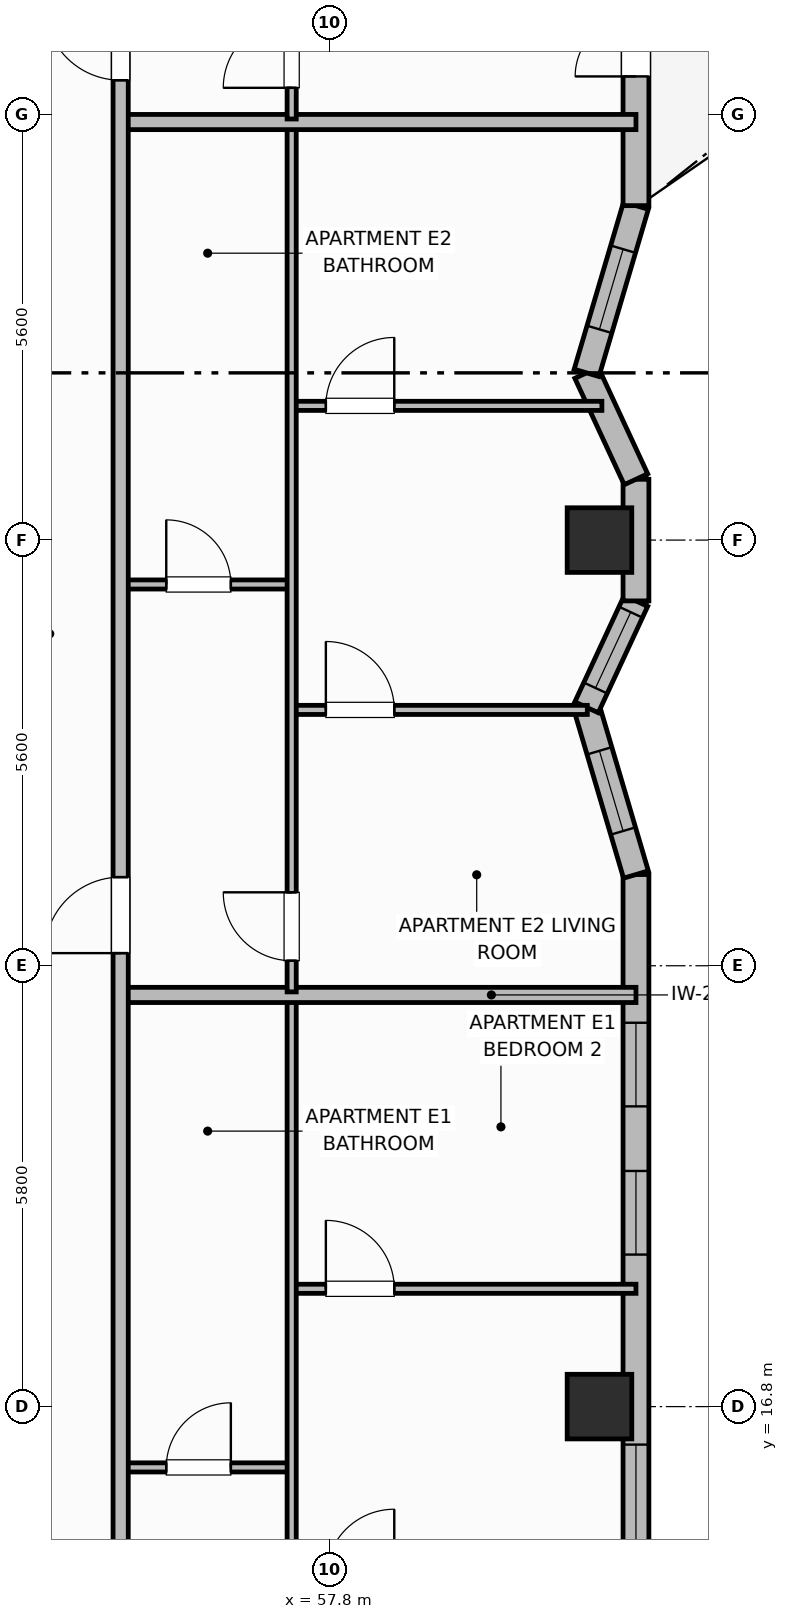
"""IFC4 building model, lengths in metres.
Left out: names, types, materials, properties, quantities, classifications, styles, units other than length and angle.
Written with IfcOpenShell. Run it as: python <this file> out.ifc"""

import sys

from ifc_helpers import new_model, si_unit, direction, frame, frame_2d, origin, origin_2d, place, context, subcontext, project, spatial, rectangle, extrude, element, fill, save


model = new_model("IFC4")
c1 = context("Model", 3, precision=1e-05, world=origin(), true_north=direction((0.0, 1.0)))
c2 = subcontext(c1, "Body", "Model", "MODEL_VIEW")
j1 = project(units=[si_unit("LENGTHUNIT", "METRE"), si_unit("PLANEANGLEUNIT", "RADIAN")], contexts=[c1])
p1 = place(None, origin())
s1 = spatial("IfcSite", under=j1, at=p1, CompositionType="ELEMENT")
p2 = place(p1, origin())
s2 = spatial("IfcBuilding", under=s1, at=p2, CompositionType="ELEMENT")
p3 = place(p2, frame((0.0, 0.0, 211.0)))
s3 = spatial("IfcBuildingStorey", under=s2, at=p3, CompositionType="ELEMENT", Elevation=211.0)
for number, where, z_axis, x_axis in (
    (1, (61.35, 16.8, 0.0), (0.0, 0.0, 1.0), (1.0, 0.0, 0.0)),
    (2, (61.35, 28.2, 0.0), (0.0, 0.0, 1.0), (1.0, 0.0, 0.0)),
):
    element("IfcColumn", number, at=place(p3, frame(where, z_axis=z_axis, x_axis=x_axis)), inside=s3, PredefinedType="COLUMN", context=c2, shape_type="SweptSolid", body=[
        extrude(rectangle(XDim=0.85, YDim=0.85, at=origin_2d()), origin(), (0.0, 0.0, 1.0), 3.7),
    ])
p4 = place(p3, frame((61.83, 10.5, 0.0), z_axis=(0.0, 0.0, 1.0), x_axis=(0.0, 1.0, 0.0)))
e3 = element("IfcWall", 3, at=p4, inside=s3, PredefinedType="SOLIDWALL", context=c2, shape_type="SweptSolid", body=[
    extrude(rectangle(XDim=13.3, YDim=0.34, at=frame_2d((6.65, 0.0))), origin(), (0.0, 0.0, 1.0), 2.72),
])
p5 = place(p4, frame((1.6, 0.0, 0.95)))
e4 = element("IfcOpeningElement", 4, at=p5, cuts=e3, PredefinedType="OPENING", context=c2, shape_type="SweptSolid", body=[
    extrude(rectangle(XDim=1.1, YDim=1.65, at=frame_2d((0.55, 0.825))), frame((0.0, 0.18, 0.0), z_axis=(0.0, -1.0, 0.0), x_axis=(1.0, 0.0, 0.0)), (0.0, 0.0, 1.0), 0.36),
])
p6 = place(p4, frame((4.4, 0.0, 0.71)))
e5 = element("IfcOpeningElement", 5, at=p6, cuts=e3, PredefinedType="OPENING", context=c2, shape_type="SweptSolid", body=[
    extrude(rectangle(XDim=1.4, YDim=1.85, at=frame_2d((0.7, 0.925))), frame((0.0, 0.18, 0.0), z_axis=(0.0, -1.0, 0.0), x_axis=(1.0, 0.0, 0.0)), (0.0, 0.0, 1.0), 0.36),
])
p7 = place(p4, frame((8.3, 0.0, 0.95)))
e6 = element("IfcOpeningElement", 6, at=p7, cuts=e3, PredefinedType="OPENING", context=c2, shape_type="SweptSolid", body=[
    extrude(rectangle(XDim=1.1, YDim=1.65, at=frame_2d((0.55, 0.825))), frame((0.0, 0.18, 0.0), z_axis=(0.0, -1.0, 0.0), x_axis=(1.0, 0.0, 0.0)), (0.0, 0.0, 1.0), 0.36),
])
p8 = place(p4, frame((10.25, 0.0, 0.95)))
e7 = element("IfcOpeningElement", 7, at=p8, cuts=e3, PredefinedType="OPENING", context=c2, shape_type="SweptSolid", body=[
    extrude(rectangle(XDim=1.1, YDim=1.65, at=frame_2d((0.55, 0.825))), frame((0.0, 0.18, 0.0), z_axis=(0.0, -1.0, 0.0), x_axis=(1.0, 0.0, 0.0)), (0.0, 0.0, 1.0), 0.36),
])
p9 = place(p3, frame((61.83, 23.8, 0.0), z_axis=(0.0, 0.0, 1.0), x_axis=(-0.283410652833, 0.958998645391, 0.0)))
e8 = element("IfcWall", 8, at=p9, inside=s3, PredefinedType="SOLIDWALL", context=c2, shape_type="SweptSolid", body=[
    extrude(rectangle(XDim=2.294, YDim=0.34, at=frame_2d((1.147, 0.0))), origin(), (0.0, 0.0, 1.0), 2.72),
])
p10 = place(p9, frame((0.597, 0.0, 0.91)))
e9 = element("IfcOpeningElement", 9, at=p10, cuts=e8, PredefinedType="OPENING", context=c2, shape_type="SweptSolid", body=[
    extrude(rectangle(XDim=1.1, YDim=1.65, at=frame_2d((0.55, 0.825))), frame((0.0, 0.18, 0.0), z_axis=(0.0, -1.0, 0.0), x_axis=(1.0, 0.0, 0.0)), (0.0, 0.0, 1.0), 0.36),
])
p11 = place(p3, frame((61.18, 26.0, 0.0), z_axis=(0.0, 0.0, 1.0), x_axis=(0.421213543339, 0.906961493619, 0.0)))
e10 = element("IfcWall", 10, at=p11, inside=s3, PredefinedType="SOLIDWALL", context=c2, shape_type="SweptSolid", body=[
    extrude(rectangle(XDim=1.543, YDim=0.34, at=frame_2d((0.772, 0.0))), origin(), (0.0, 0.0, 1.0), 2.72),
])
p12 = place(p11, frame((0.28, 0.0, 0.91)))
e11 = element("IfcOpeningElement", 11, at=p12, cuts=e10, PredefinedType="OPENING", context=c2, shape_type="SweptSolid", body=[
    extrude(rectangle(XDim=1.1, YDim=1.65, at=frame_2d((0.55, 0.825))), frame((0.0, 0.18, 0.0), z_axis=(0.0, -1.0, 0.0), x_axis=(1.0, 0.0, 0.0)), (0.0, 0.0, 1.0), 0.36),
])
p13 = place(p3, frame((61.83, 27.4, 0.0), z_axis=(0.0, 0.0, 1.0), x_axis=(0.0, 1.0, 0.0)))
e12 = element("IfcWall", 12, at=p13, inside=s3, PredefinedType="SOLIDWALL", context=c2, shape_type="SweptSolid", body=[
    extrude(rectangle(XDim=1.6, YDim=0.34, at=frame_2d((0.8, 0.0))), origin(), (0.0, 0.0, 1.0), 2.72),
])
p14 = place(p3, frame((61.83, 29.0, 0.0), z_axis=(0.0, 0.0, 1.0), x_axis=(-0.421213543339, 0.906961493619, 0.0)))
e13 = element("IfcWall", 13, at=p14, inside=s3, PredefinedType="SOLIDWALL", context=c2, shape_type="SweptSolid", body=[
    extrude(rectangle(XDim=1.543, YDim=0.34, at=frame_2d((0.772, 0.0))), origin(), (0.0, 0.0, 1.0), 2.72),
])
p15 = place(p3, frame((61.18, 30.4, 0.0), z_axis=(0.0, 0.0, 1.0), x_axis=(0.283381730269, 0.959007192335, 0.0)))
e14 = element("IfcWall", 14, at=p15, inside=s3, PredefinedType="SOLIDWALL", context=c2, shape_type="SweptSolid", body=[
    extrude(rectangle(XDim=2.294, YDim=0.34, at=frame_2d((1.147, 0.0))), origin(), (0.0, 0.0, 1.0), 2.72),
])
p16 = place(p15, frame((0.597, 0.0, 0.91)))
e15 = element("IfcOpeningElement", 15, at=p16, cuts=e14, PredefinedType="OPENING", context=c2, shape_type="SweptSolid", body=[
    extrude(rectangle(XDim=1.1, YDim=1.65, at=frame_2d((0.55, 0.825))), frame((0.0, 0.18, 0.0), z_axis=(0.0, -1.0, 0.0), x_axis=(1.0, 0.0, 0.0)), (0.0, 0.0, 1.0), 0.36),
])
p17 = place(p3, frame((61.83, 32.6, 0.0), z_axis=(0.0, 0.0, 1.0), x_axis=(0.0, 1.0, 0.0)))
e16 = element("IfcWall", 16, at=p17, inside=s3, PredefinedType="SOLIDWALL", context=c2, shape_type="SweptSolid", body=[
    extrude(rectangle(XDim=13.3, YDim=0.34, at=frame_2d((6.65, 0.0))), origin(), (0.0, 0.0, 1.0), 2.72),
])
p18 = place(p17, frame((1.7, 0.0, 0.0)))
e17 = element("IfcOpeningElement", 17, at=p18, cuts=e16, PredefinedType="OPENING", context=c2, shape_type="SweptSolid", body=[
    extrude(rectangle(XDim=1.6, YDim=2.1, at=frame_2d((0.8, 1.05))), frame((0.0, 0.18, 0.0), z_axis=(0.0, -1.0, 0.0), x_axis=(1.0, 0.0, 0.0)), (0.0, 0.0, 1.0), 0.36),
])
p19 = place(p17, frame((7.48, 0.0, 0.71)))
e18 = element("IfcOpeningElement", 18, at=p19, cuts=e16, PredefinedType="OPENING", context=c2, shape_type="SweptSolid", body=[
    extrude(rectangle(XDim=1.4, YDim=1.85, at=frame_2d((0.7, 0.925))), frame((0.0, 0.18, 0.0), z_axis=(0.0, -1.0, 0.0), x_axis=(1.0, 0.0, 0.0)), (0.0, 0.0, 1.0), 0.36),
])
p20 = place(p17, frame((9.6, 0.0, 0.7)))
e19 = element("IfcOpeningElement", 19, at=p20, cuts=e16, PredefinedType="OPENING", context=c2, shape_type="SweptSolid", body=[
    extrude(rectangle(XDim=2.1, YDim=1.9, at=frame_2d((1.05, 0.95))), frame((0.0, 0.18, 0.0), z_axis=(0.0, -1.0, 0.0), x_axis=(1.0, 0.0, 0.0)), (0.0, 0.0, 1.0), 0.36),
])
p21 = place(p3, frame((55.05, 16.0, 0.0), z_axis=(0.0, 0.0, 1.0), x_axis=(1.0, 0.0, 0.0)))
e20 = element("IfcWall", 20, at=p21, inside=s3, PredefinedType="PARTITIONING", context=c2, shape_type="SweptSolid", body=[
    extrude(rectangle(XDim=2.25, YDim=0.12, at=frame_2d((1.125, 0.0))), origin(), (0.0, 0.0, 1.0), 2.55),
])
p22 = place(p21, frame((0.6, 0.0, 0.0)))
e21 = element("IfcOpeningElement", 21, at=p22, cuts=e20, PredefinedType="OPENING", context=c2, shape_type="SweptSolid", body=[
    extrude(rectangle(XDim=0.85, YDim=2.1, at=frame_2d((0.425, 1.05))), frame((0.0, 0.07, 0.0), z_axis=(0.0, -1.0, 0.0), x_axis=(1.0, 0.0, 0.0)), (0.0, 0.0, 1.0), 0.14),
])
p23 = place(p3, frame((57.3, 18.35, 0.0), z_axis=(0.0, 0.0, 1.0), x_axis=(1.0, 0.0, 0.0)))
e22 = element("IfcWall", 22, at=p23, inside=s3, PredefinedType="PARTITIONING", context=c2, shape_type="SweptSolid", body=[
    extrude(rectangle(XDim=4.53, YDim=0.12, at=frame_2d((2.265, 0.0))), origin(), (0.0, 0.0, 1.0), 2.55),
])
p24 = place(p23, frame((0.45, 0.0, 0.0)))
e23 = element("IfcOpeningElement", 23, at=p24, cuts=e22, PredefinedType="OPENING", context=c2, shape_type="SweptSolid", body=[
    extrude(rectangle(XDim=0.9, YDim=2.1, at=frame_2d((0.45, 1.05))), frame((0.0, 0.07, 0.0), z_axis=(0.0, -1.0, 0.0), x_axis=(1.0, 0.0, 0.0)), (0.0, 0.0, 1.0), 0.14),
])
p25 = place(p3, frame((57.3, 10.64, 0.0), z_axis=(0.0, 0.0, 1.0), x_axis=(0.0, 1.0, 0.0)))
e24 = element("IfcWall", 24, at=p25, inside=s3, PredefinedType="PARTITIONING", context=c2, shape_type="SweptSolid", body=[
    extrude(rectangle(XDim=11.536, YDim=0.12, at=frame_2d((5.768, 0.0))), origin(), (0.0, 0.0, 1.0), 2.55),
])
p26 = place(p25, frame((0.41, 0.0, 0.0)))
e25 = element("IfcOpeningElement", 25, at=p26, cuts=e24, PredefinedType="OPENING", context=c2, shape_type="SweptSolid", body=[
    extrude(rectangle(XDim=0.9, YDim=2.1, at=frame_2d((0.45, 1.05))), frame((0.0, 0.07, 0.0), z_axis=(0.0, -1.0, 0.0), x_axis=(1.0, 0.0, 0.0)), (0.0, 0.0, 1.0), 0.14),
])
p27 = place(p3, frame((55.05, 22.216, 0.0), z_axis=(0.0, 0.0, 1.0), x_axis=(1.0, 0.0, 0.0)))
e26 = element("IfcWall", 26, at=p27, inside=s3, PredefinedType="PARTITIONING", context=c2, shape_type="SweptSolid", body=[
    extrude(rectangle(XDim=6.78, YDim=0.2, at=frame_2d((3.39, 0.0))), origin(), (0.0, 0.0, 1.0), 2.55),
])
p28 = place(p3, frame((55.05, 27.616, 0.0), z_axis=(0.0, 0.0, 1.0), x_axis=(1.0, 0.0, 0.0)))
e27 = element("IfcWall", 27, at=p28, inside=s3, PredefinedType="PARTITIONING", context=c2, shape_type="SweptSolid", body=[
    extrude(rectangle(XDim=2.25, YDim=0.12, at=frame_2d((1.125, 0.0))), origin(), (0.0, 0.0, 1.0), 2.55),
])
p29 = place(p28, frame((0.6, 0.0, 0.0)))
e28 = element("IfcOpeningElement", 28, at=p29, cuts=e27, PredefinedType="OPENING", context=c2, shape_type="SweptSolid", body=[
    extrude(rectangle(XDim=0.85, YDim=2.1, at=frame_2d((0.425, 1.05))), frame((0.0, 0.07, 0.0), z_axis=(0.0, -1.0, 0.0), x_axis=(1.0, 0.0, 0.0)), (0.0, 0.0, 1.0), 0.14),
])
p30 = place(p3, frame((57.3, 25.966, 0.0), z_axis=(0.0, 0.0, 1.0), x_axis=(1.0, 0.0, 0.0)))
e29 = element("IfcWall", 29, at=p30, inside=s3, PredefinedType="PARTITIONING", context=c2, shape_type="SweptSolid", body=[
    extrude(rectangle(XDim=3.89, YDim=0.12, at=frame_2d((1.945, 0.0))), origin(), (0.0, 0.0, 1.0), 2.55),
])
p31 = place(p30, frame((0.45, 0.0, 0.0)))
e30 = element("IfcOpeningElement", 30, at=p31, cuts=e29, PredefinedType="OPENING", context=c2, shape_type="SweptSolid", body=[
    extrude(rectangle(XDim=0.9, YDim=2.1, at=frame_2d((0.45, 1.05))), frame((0.0, 0.07, 0.0), z_axis=(0.0, -1.0, 0.0), x_axis=(1.0, 0.0, 0.0)), (0.0, 0.0, 1.0), 0.14),
])
p32 = place(p3, frame((57.3, 29.966, 0.0), z_axis=(0.0, 0.0, 1.0), x_axis=(1.0, 0.0, 0.0)))
e31 = element("IfcWall", 31, at=p32, inside=s3, PredefinedType="PARTITIONING", context=c2, shape_type="SweptSolid", body=[
    extrude(rectangle(XDim=4.082, YDim=0.12, at=frame_2d((2.041, 0.0))), origin(), (0.0, 0.0, 1.0), 2.55),
])
p33 = place(p32, frame((0.45, 0.0, 0.0)))
e32 = element("IfcOpeningElement", 32, at=p33, cuts=e31, PredefinedType="OPENING", context=c2, shape_type="SweptSolid", body=[
    extrude(rectangle(XDim=0.9, YDim=2.1, at=frame_2d((0.45, 1.05))), frame((0.0, 0.07, 0.0), z_axis=(0.0, -1.0, 0.0), x_axis=(1.0, 0.0, 0.0)), (0.0, 0.0, 1.0), 0.14),
])
p34 = place(p3, frame((57.3, 22.256, 0.0), z_axis=(0.0, 0.0, 1.0), x_axis=(0.0, 1.0, 0.0)))
e33 = element("IfcWall", 33, at=p34, inside=s3, PredefinedType="PARTITIONING", context=c2, shape_type="SweptSolid", body=[
    extrude(rectangle(XDim=11.404, YDim=0.12, at=frame_2d((5.702, 0.0))), origin(), (0.0, 0.0, 1.0), 2.55),
])
p35 = place(p34, frame((0.41, 0.0, 0.0)))
e34 = element("IfcOpeningElement", 34, at=p35, cuts=e33, PredefinedType="OPENING", context=c2, shape_type="SweptSolid", body=[
    extrude(rectangle(XDim=0.9, YDim=2.1, at=frame_2d((0.45, 1.05))), frame((0.0, 0.07, 0.0), z_axis=(0.0, -1.0, 0.0), x_axis=(1.0, 0.0, 0.0)), (0.0, 0.0, 1.0), 0.14),
])
p36 = place(p3, frame((55.05, 33.7, 0.0), z_axis=(0.0, 0.0, 1.0), x_axis=(1.0, 0.0, 0.0)))
e35 = element("IfcWall", 35, at=p36, inside=s3, PredefinedType="PARTITIONING", context=c2, shape_type="SweptSolid", body=[
    extrude(rectangle(XDim=6.78, YDim=0.2, at=frame_2d((3.39, 0.0))), origin(), (0.0, 0.0, 1.0), 2.55),
])
p37 = place(p3, frame((57.3, 33.74, 0.0), z_axis=(0.0, 0.0, 1.0), x_axis=(0.0, 1.0, 0.0)))
e36 = element("IfcWall", 36, at=p37, inside=s3, PredefinedType="PARTITIONING", context=c2, shape_type="SweptSolid", body=[
    extrude(rectangle(XDim=12.02, YDim=0.12, at=frame_2d((6.01, 0.0))), origin(), (0.0, 0.0, 1.0), 2.55),
])
p38 = place(p37, frame((0.41, 0.0, 0.0)))
e37 = element("IfcOpeningElement", 37, at=p38, cuts=e36, PredefinedType="OPENING", context=c2, shape_type="SweptSolid", body=[
    extrude(rectangle(XDim=0.9, YDim=2.1, at=frame_2d((0.45, 1.05))), frame((0.0, 0.07, 0.0), z_axis=(0.0, -1.0, 0.0), x_axis=(1.0, 0.0, 0.0)), (0.0, 0.0, 1.0), 0.14),
])
p39 = place(p37, frame((10.185, 0.0, 0.0)))
e38 = element("IfcOpeningElement", 38, at=p39, cuts=e36, PredefinedType="OPENING", context=c2, shape_type="SweptSolid", body=[
    extrude(rectangle(XDim=0.82, YDim=2.08, at=frame_2d((0.41, 1.04))), frame((0.0, 0.07, 0.0), z_axis=(0.0, -1.0, 0.0), x_axis=(1.0, 0.0, 0.0)), (0.0, 0.0, 1.0), 0.14),
])
p40 = place(p3, frame((55.05, 10.6, 0.0), z_axis=(0.0, 0.0, 1.0), x_axis=(0.0, 1.0, 0.0)))
e39 = element("IfcWall", 39, at=p40, inside=s3, PredefinedType="PARTITIONING", context=c2, shape_type="SweptSolid", body=[
    extrude(rectangle(XDim=35.2, YDim=0.2, at=frame_2d((17.6, 0.0))), origin(), (0.0, 0.0, 1.0), 2.55),
])
p41 = place(p40, frame((2.65, 0.0, 0.0)))
e40 = element("IfcOpeningElement", 40, at=p41, cuts=e39, PredefinedType="OPENING", context=c2, shape_type="SweptSolid", body=[
    extrude(rectangle(XDim=1.0, YDim=2.15, at=frame_2d((0.5, 1.075))), frame((0.0, 0.11, 0.0), z_axis=(0.0, -1.0, 0.0), x_axis=(1.0, 0.0, 0.0)), (0.0, 0.0, 1.0), 0.22),
])
p42 = place(p40, frame((12.166, 0.0, 0.0)))
e41 = element("IfcOpeningElement", 41, at=p42, cuts=e39, PredefinedType="OPENING", context=c2, shape_type="SweptSolid", body=[
    extrude(rectangle(XDim=1.0, YDim=2.15, at=frame_2d((0.5, 1.075))), frame((0.0, 0.11, 0.0), z_axis=(0.0, -1.0, 0.0), x_axis=(1.0, 0.0, 0.0)), (0.0, 0.0, 1.0), 0.22),
])
p43 = place(p40, frame((23.65, 0.0, 0.0)))
e42 = element("IfcOpeningElement", 42, at=p43, cuts=e39, PredefinedType="OPENING", context=c2, shape_type="SweptSolid", body=[
    extrude(rectangle(XDim=1.0, YDim=2.15, at=frame_2d((0.5, 1.075))), frame((0.0, 0.11, 0.0), z_axis=(0.0, -1.0, 0.0), x_axis=(1.0, 0.0, 0.0)), (0.0, 0.0, 1.0), 0.22),
])
p44 = place(p6, origin())
e43 = element("IfcWindow", 43, at=p44, inside=s3, PartitioningType="SINGLE_PANEL", PredefinedType="WINDOW", context=c2, shape_type="SweptSolid", body=[
    extrude(rectangle(XDim=1.4, YDim=1.85, at=frame_2d((0.7, 0.925))), frame((0.0, 0.03, 0.0), z_axis=(0.0, -1.0, 0.0), x_axis=(1.0, 0.0, 0.0)), (0.0, 0.0, 1.0), 0.06),
])
fill(e5, e43)
p45 = place(p7, origin())
e44 = element("IfcWindow", 44, at=p45, inside=s3, PartitioningType="SINGLE_PANEL", PredefinedType="WINDOW", context=c2, shape_type="SweptSolid", body=[
    extrude(rectangle(XDim=1.1, YDim=1.65, at=frame_2d((0.55, 0.825))), frame((0.0, 0.03, 0.0), z_axis=(0.0, -1.0, 0.0), x_axis=(1.0, 0.0, 0.0)), (0.0, 0.0, 1.0), 0.06),
])
fill(e6, e44)
p46 = place(p8, origin())
e45 = element("IfcWindow", 45, at=p46, inside=s3, PartitioningType="SINGLE_PANEL", PredefinedType="WINDOW", context=c2, shape_type="SweptSolid", body=[
    extrude(rectangle(XDim=1.1, YDim=1.65, at=frame_2d((0.55, 0.825))), frame((0.0, 0.03, 0.0), z_axis=(0.0, -1.0, 0.0), x_axis=(1.0, 0.0, 0.0)), (0.0, 0.0, 1.0), 0.06),
])
fill(e7, e45)
p47 = place(p10, origin())
e46 = element("IfcWindow", 46, at=p47, inside=s3, PartitioningType="SINGLE_PANEL", PredefinedType="WINDOW", context=c2, shape_type="SweptSolid", body=[
    extrude(rectangle(XDim=1.1, YDim=1.65, at=frame_2d((0.55, 0.825))), frame((0.0, 0.03, 0.0), z_axis=(0.0, -1.0, 0.0), x_axis=(1.0, 0.0, 0.0)), (0.0, 0.0, 1.0), 0.06),
])
fill(e9, e46)
p48 = place(p12, origin())
e47 = element("IfcWindow", 47, at=p48, inside=s3, PartitioningType="SINGLE_PANEL", PredefinedType="WINDOW", context=c2, shape_type="SweptSolid", body=[
    extrude(rectangle(XDim=1.1, YDim=1.65, at=frame_2d((0.55, 0.825))), frame((0.0, 0.03, 0.0), z_axis=(0.0, -1.0, 0.0), x_axis=(1.0, 0.0, 0.0)), (0.0, 0.0, 1.0), 0.06),
])
fill(e11, e47)
p49 = place(p16, origin())
e48 = element("IfcWindow", 48, at=p49, inside=s3, PartitioningType="SINGLE_PANEL", PredefinedType="WINDOW", context=c2, shape_type="SweptSolid", body=[
    extrude(rectangle(XDim=1.1, YDim=1.65, at=frame_2d((0.55, 0.825))), frame((0.0, 0.03, 0.0), z_axis=(0.0, -1.0, 0.0), x_axis=(1.0, 0.0, 0.0)), (0.0, 0.0, 1.0), 0.06),
])
fill(e15, e48)
p50 = place(p18, origin())
e49 = element("IfcDoor", 49, at=p50, inside=s3, OperationType="DOUBLE_DOOR_SINGLE_SWING", PredefinedType="DOOR", context=c2, shape_type="SweptSolid", body=[
    extrude(rectangle(XDim=1.6, YDim=2.1, at=frame_2d((0.8, 1.05))), frame((0.0, 0.025, 0.0), z_axis=(0.0, -1.0, 0.0), x_axis=(1.0, 0.0, 0.0)), (0.0, 0.0, 1.0), 0.05),
])
fill(e17, e49)
p51 = place(p22, origin())
e50 = element("IfcDoor", 50, at=p51, inside=s3, OperationType="SINGLE_SWING_RIGHT", PredefinedType="DOOR", context=c2, shape_type="SweptSolid", body=[
    extrude(rectangle(XDim=0.85, YDim=2.1, at=frame_2d((0.425, 1.05))), frame((0.0, 0.025, 0.0), z_axis=(0.0, -1.0, 0.0), x_axis=(1.0, 0.0, 0.0)), (0.0, 0.0, 1.0), 0.05),
])
fill(e21, e50)
p52 = place(p24, origin())
e51 = element("IfcDoor", 51, at=p52, inside=s3, OperationType="SINGLE_SWING_LEFT", PredefinedType="DOOR", context=c2, shape_type="SweptSolid", body=[
    extrude(rectangle(XDim=0.9, YDim=2.1, at=frame_2d((0.45, 1.05))), frame((0.0, 0.025, 0.0), z_axis=(0.0, -1.0, 0.0), x_axis=(1.0, 0.0, 0.0)), (0.0, 0.0, 1.0), 0.05),
])
fill(e23, e51)
p53 = place(p29, origin())
e52 = element("IfcDoor", 52, at=p53, inside=s3, OperationType="SINGLE_SWING_LEFT", PredefinedType="DOOR", context=c2, shape_type="SweptSolid", body=[
    extrude(rectangle(XDim=0.85, YDim=2.1, at=frame_2d((0.425, 1.05))), frame((0.0, 0.025, 0.0), z_axis=(0.0, -1.0, 0.0), x_axis=(1.0, 0.0, 0.0)), (0.0, 0.0, 1.0), 0.05),
])
fill(e28, e52)
p54 = place(p31, origin())
e53 = element("IfcDoor", 53, at=p54, inside=s3, OperationType="SINGLE_SWING_LEFT", PredefinedType="DOOR", context=c2, shape_type="SweptSolid", body=[
    extrude(rectangle(XDim=0.9, YDim=2.1, at=frame_2d((0.45, 1.05))), frame((0.0, 0.025, 0.0), z_axis=(0.0, -1.0, 0.0), x_axis=(1.0, 0.0, 0.0)), (0.0, 0.0, 1.0), 0.05),
])
fill(e30, e53)
p55 = place(p33, origin())
e54 = element("IfcDoor", 54, at=p55, inside=s3, OperationType="SINGLE_SWING_RIGHT", PredefinedType="DOOR", context=c2, shape_type="SweptSolid", body=[
    extrude(rectangle(XDim=0.9, YDim=2.1, at=frame_2d((0.45, 1.05))), frame((0.0, 0.025, 0.0), z_axis=(0.0, -1.0, 0.0), x_axis=(1.0, 0.0, 0.0)), (0.0, 0.0, 1.0), 0.05),
])
fill(e32, e54)
p56 = place(p35, origin())
e55 = element("IfcDoor", 55, at=p56, inside=s3, OperationType="SINGLE_SWING_RIGHT", PredefinedType="DOOR", context=c2, shape_type="SweptSolid", body=[
    extrude(rectangle(XDim=0.9, YDim=2.1, at=frame_2d((0.45, 1.05))), frame((0.0, 0.025, 0.0), z_axis=(0.0, -1.0, 0.0), x_axis=(1.0, 0.0, 0.0)), (0.0, 0.0, 1.0), 0.05),
])
fill(e34, e55)
p57 = place(p38, origin())
e56 = element("IfcDoor", 56, at=p57, inside=s3, OperationType="SINGLE_SWING_LEFT", PredefinedType="DOOR", context=c2, shape_type="SweptSolid", body=[
    extrude(rectangle(XDim=0.9, YDim=2.1, at=frame_2d((0.45, 1.05))), frame((0.0, 0.025, 0.0), z_axis=(0.0, -1.0, 0.0), x_axis=(1.0, 0.0, 0.0)), (0.0, 0.0, 1.0), 0.05),
])
fill(e37, e56)
p58 = place(p42, origin())
e57 = element("IfcDoor", 57, at=p58, inside=s3, OperationType="SINGLE_SWING_LEFT", PredefinedType="DOOR", context=c2, shape_type="SweptSolid", body=[
    extrude(rectangle(XDim=1.0, YDim=2.15, at=frame_2d((0.5, 1.075))), frame((0.0, 0.025, 0.0), z_axis=(0.0, -1.0, 0.0), x_axis=(1.0, 0.0, 0.0)), (0.0, 0.0, 1.0), 0.05),
])
fill(e41, e57)
p59 = place(p43, origin())
e58 = element("IfcDoor", 58, at=p59, inside=s3, OperationType="SINGLE_SWING_RIGHT", PredefinedType="DOOR", context=c2, shape_type="SweptSolid", body=[
    extrude(rectangle(XDim=1.0, YDim=2.15, at=frame_2d((0.5, 1.075))), frame((0.0, 0.025, 0.0), z_axis=(0.0, -1.0, 0.0), x_axis=(1.0, 0.0, 0.0)), (0.0, 0.0, 1.0), 0.05),
])
fill(e42, e58)
save(model, sys.argv[1])
